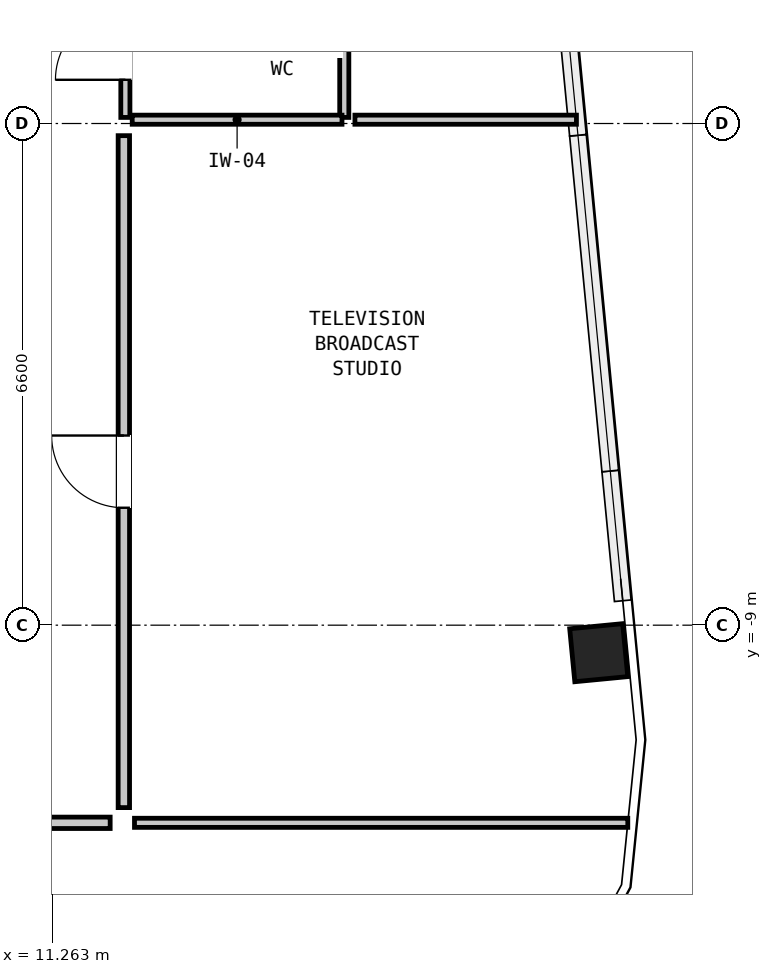
"""IFC4 building model, lengths in metres.
Left out: names, types, materials, properties, quantities, classifications, styles, units other than length and angle.
Written with IfcOpenShell. Run it as: python <this file> out.ifc"""

import sys

from ifc_helpers import new_model, si_unit, direction, frame, frame_2d, origin, origin_2d, place, context, subcontext, project, spatial, rectangle, hollow_rectangle, extrude, element, fill, save


model = new_model("IFC4")
c1 = context("Model", 3, precision=1e-05, world=origin(), true_north=direction((0.0, 1.0)))
c2 = subcontext(c1, "Body", "Model", "MODEL_VIEW")
j1 = project(units=[si_unit("LENGTHUNIT", "METRE"), si_unit("PLANEANGLEUNIT", "RADIAN")], contexts=[c1])
p1 = place(None, origin())
s1 = spatial("IfcSite", under=j1, at=p1, CompositionType="ELEMENT")
p2 = place(p1, origin())
s2 = spatial("IfcBuilding", under=s1, at=p2, CompositionType="ELEMENT")
p3 = place(p2, frame((0.0, 0.0, 159.2)))
s3 = spatial("IfcBuildingStorey", under=s2, at=p3, CompositionType="ELEMENT", Elevation=159.2)
p4 = place(p3, frame((18.448, -9.362, 0.0), z_axis=(0.0, 0.0, 1.0), x_axis=(-0.09584575252, 0.995396198367, 0.0)))
e1 = element("IfcColumn", 1, at=p4, inside=s3, PredefinedType="COLUMN", context=c2, shape_type="SweptSolid", body=[
    extrude(hollow_rectangle(XDim=0.7, YDim=0.7, WallThickness=0.045, at=origin_2d()), origin(), (0.0, 0.0, 1.0), 3.05),
])
p5 = place(p3, frame((12.22, -2.32, 0.0), z_axis=(0.0, 0.0, 1.0), x_axis=(0.0, 1.0, 0.0)))
e2 = element("IfcWall", 2, at=p5, inside=s3, PredefinedType="PARTITIONING", context=c2, shape_type="SweptSolid", body=[
    extrude(rectangle(XDim=1.94, YDim=0.12, at=frame_2d((0.97, 0.0))), origin(), (0.0, 0.0, 1.0), 2.83),
])
p6 = place(p5, frame((0.495, 0.0, 0.0)))
e3 = element("IfcOpeningElement", 3, at=p6, cuts=e2, PredefinedType="OPENING", context=c2, shape_type="SweptSolid", body=[
    extrude(rectangle(XDim=0.92, YDim=2.1, at=frame_2d((0.46, 1.05))), frame((0.0, 0.072, 0.0), z_axis=(0.0, -1.0, 0.0), x_axis=(1.0, 0.0, 0.0)), (0.0, 0.0, 1.0), 0.144),
])
p7 = place(p3, frame((15.1, -2.32, 0.0), z_axis=(0.0, 0.0, 1.0), x_axis=(0.0, 1.0, 0.0)))
e4 = element("IfcWall", 4, at=p7, inside=s3, PredefinedType="PARTITIONING", context=c2, shape_type="SweptSolid", body=[
    extrude(rectangle(XDim=5.93, YDim=0.12, at=frame_2d((2.965, 0.0))), origin(), (0.0, 0.0, 1.0), 2.83),
])
p8 = place(p3, frame((12.31, -2.35, 0.0), z_axis=(0.0, 0.0, 1.0), x_axis=(1.0, 0.0, 0.0)))
e5 = element("IfcWall", 5, at=p8, inside=s3, PredefinedType="PARTITIONING", context=c2, shape_type="SweptSolid", body=[
    extrude(rectangle(XDim=2.76, YDim=0.12, at=frame_2d((1.38, 0.0))), origin(), (0.0, 0.0, 1.0), 1.883),
])
p9 = place(p3, frame((12.34, -11.6, 0.0), z_axis=(0.0, 0.0, 1.0), x_axis=(1.0, 0.0, 0.0)))
e6 = element("IfcWall", 6, at=p9, inside=s3, PredefinedType="PARTITIONING", context=c2, shape_type="SweptSolid", body=[
    extrude(rectangle(XDim=6.49, YDim=0.12, at=frame_2d((3.245, 0.0))), origin(), (0.0, 0.0, 1.0), 2.347),
])
p10 = place(p3, frame((15.24, -2.35, 0.0), z_axis=(0.0, 0.0, 1.0), x_axis=(1.0, 0.0, 0.0)))
e7 = element("IfcWall", 7, at=p10, inside=s3, PredefinedType="PARTITIONING", context=c2, shape_type="SweptSolid", body=[
    extrude(rectangle(XDim=2.914, YDim=0.12, at=frame_2d((1.457, 0.0))), origin(), (0.0, 0.0, 1.0), 1.883),
])
p11 = place(p3, frame((-12.02, -11.6, 0.0), z_axis=(0.0, 0.0, 1.0), x_axis=(1.0, 0.0, 0.0)))
e8 = element("IfcWall", 8, at=p11, inside=s3, PredefinedType="PARTITIONING", context=c2, shape_type="SweptSolid", body=[
    extrude(rectangle(XDim=24.04, YDim=0.15, at=frame_2d((12.02, 0.0))), origin(), (0.0, 0.0, 1.0), 2.347),
])
p12 = place(p11, frame((11.545, 0.0, 0.0)))
e9 = element("IfcOpeningElement", 9, at=p12, cuts=e8, PredefinedType="OPENING", context=c2, shape_type="SweptSolid", body=[
    extrude(rectangle(XDim=0.95, YDim=2.1, at=frame_2d((0.475, 1.05))), frame((0.0, 0.087, 0.0), z_axis=(0.0, -1.0, 0.0), x_axis=(1.0, 0.0, 0.0)), (0.0, 0.0, 1.0), 0.174),
])
p13 = place(p3, frame((12.2, -11.4, 0.0), z_axis=(0.0, 0.0, 1.0), x_axis=(0.0, 1.0, 0.0)))
e10 = element("IfcWall", 10, at=p13, inside=s3, PredefinedType="PARTITIONING", context=c2, shape_type="SweptSolid", body=[
    extrude(rectangle(XDim=8.84, YDim=0.15, at=frame_2d((4.42, 0.0))), origin(), (0.0, 0.0, 1.0), 2.83),
])
p14 = place(p13, frame((3.945, 0.0, 0.0)))
e11 = element("IfcOpeningElement", 11, at=p14, cuts=e10, PredefinedType="OPENING", context=c2, shape_type="SweptSolid", body=[
    extrude(rectangle(XDim=0.95, YDim=2.1, at=frame_2d((0.475, 1.05))), frame((0.0, 0.087, 0.0), z_axis=(0.0, -1.0, 0.0), x_axis=(1.0, 0.0, 0.0)), (0.0, 0.0, 1.0), 0.174),
])
p15 = place(p6, origin())
e12 = element("IfcDoor", 12, at=p15, inside=s3, OperationType="SINGLE_SWING_LEFT", PredefinedType="DOOR", context=c2, shape_type="SweptSolid", body=[
    extrude(rectangle(XDim=0.92, YDim=2.1, at=frame_2d((0.46, 1.05))), frame((0.0, 0.025, 0.0), z_axis=(0.0, -1.0, 0.0), x_axis=(1.0, 0.0, 0.0)), (0.0, 0.0, 1.0), 0.05),
])
fill(e3, e12)
p16 = place(p14, origin())
e13 = element("IfcDoor", 13, at=p16, inside=s3, OperationType="SINGLE_SWING_RIGHT", PredefinedType="DOOR", context=c2, shape_type="SweptSolid", body=[
    extrude(rectangle(XDim=0.95, YDim=2.1, at=frame_2d((0.475, 1.05))), frame((0.0, 0.025, 0.0), z_axis=(0.0, -1.0, 0.0), x_axis=(1.0, 0.0, 0.0)), (0.0, 0.0, 1.0), 0.05),
])
fill(e11, e13)
save(model, sys.argv[1])
